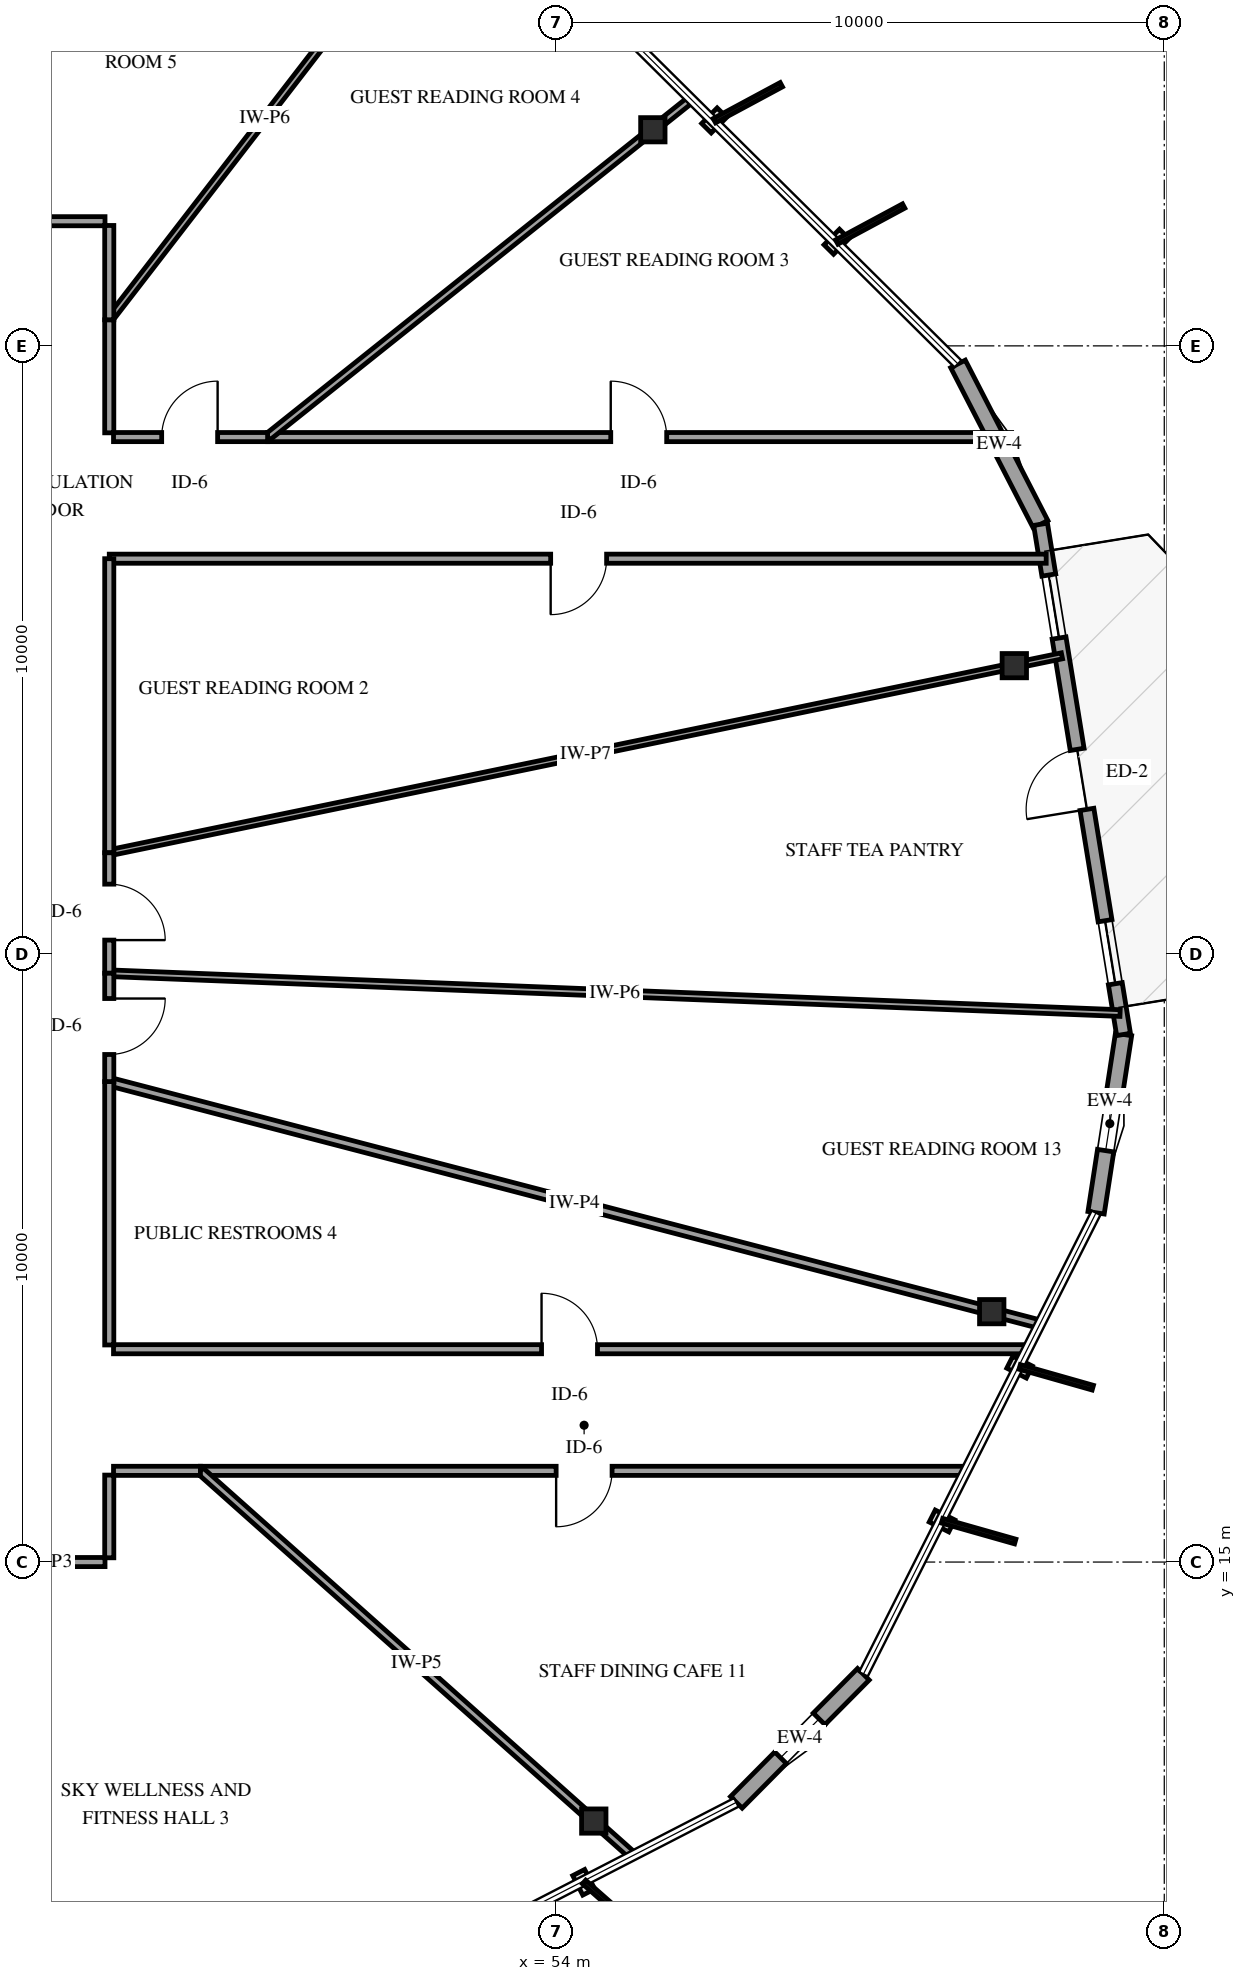
"""IFC4 building model, lengths in metres.
Left out: names, types, materials, properties, quantities, classifications, styles, units other than length and angle.
Written with IfcOpenShell. Run it as: python <this file> out.ifc"""

import sys

from ifc_helpers import new_model, si_unit, direction, frame, frame_2d, origin, origin_2d, place, context, subcontext, project, spatial, rectangle, i_section, extrude, element, fill, save


model = new_model("IFC4")
c1 = context("Model", 3, precision=1e-05, world=origin(), true_north=direction((0.0, 1.0)))
c2 = subcontext(c1, "Body", "Model", "MODEL_VIEW")
j1 = project(units=[si_unit("LENGTHUNIT", "METRE"), si_unit("PLANEANGLEUNIT", "RADIAN")], contexts=[c1])
p1 = place(None, origin())
s1 = spatial("IfcSite", under=j1, at=p1, CompositionType="ELEMENT")
p2 = place(p1, origin())
s2 = spatial("IfcBuilding", under=s1, at=p2, CompositionType="ELEMENT")
p3 = place(p2, frame((0.0, 0.0, 265.0)))
s3 = spatial("IfcBuildingStorey", under=s2, at=p3, CompositionType="ELEMENT", Elevation=265.0)
for number, where, z_axis, x_axis in (
    (1, (61.534, 29.741, 0.0), (0.0, 0.0, 1.0), (1.0, 0.0, 0.0)),
    (2, (55.589, 38.554, 0.0), (0.0, 0.0, 1.0), (1.0, 0.0, 0.0)),
    (3, (54.618, 10.74, 0.0), (0.0, 0.0, 1.0), (1.0, 0.0, 0.0)),
    (4, (61.163, 19.117, 0.0), (0.0, 0.0, 1.0), (1.0, 0.0, 0.0)),
):
    element("IfcColumn", number, at=place(p3, frame(where, z_axis=z_axis, x_axis=x_axis)), inside=s3, PredefinedType="COLUMN", context=c2, shape_type="SweptSolid", body=[
        extrude(i_section(OverallWidth=0.401, OverallDepth=0.399, WebThickness=0.025, FlangeThickness=0.04, FilletRadius=0.038, at=origin_2d()), origin(), (0.0, 0.0, 1.0), 3.75),
    ])
p4 = place(p3, frame((56.962, 11.048, 0.0), z_axis=(0.0, 0.0, 1.0), x_axis=(0.704179352497, 0.71002214016, 0.0)))
e5 = element("IfcWall", 5, at=p4, inside=s3, PredefinedType="SOLIDWALL", context=c2, shape_type="SweptSolid", body=[
    extrude(rectangle(XDim=2.967, YDim=0.27, at=frame_2d((1.483, 0.0))), origin(), (0.0, 0.0, 1.0), 2.829),
])
p5 = place(p4, frame((1.033, 0.0, 0.75)))
e6 = element("IfcOpeningElement", 6, at=p5, cuts=e5, PredefinedType="OPENING", context=c2, shape_type="SweptSolid", body=[
    extrude(rectangle(XDim=0.9, YDim=1.5, at=frame_2d((0.45, 0.75))), frame((0.0, 0.145, 0.0), z_axis=(0.0, -1.0, 0.0), x_axis=(1.0, 0.0, 0.0)), (0.0, 0.0, 1.0), 0.29),
])
p6 = place(p3, frame((62.878, 20.744, 0.0), z_axis=(0.0, 0.0, 1.0), x_axis=(0.152335472576, 0.988328843956, 0.0)))
e7 = element("IfcWall", 7, at=p6, inside=s3, PredefinedType="SOLIDWALL", context=c2, shape_type="SweptSolid", body=[
    extrude(rectangle(XDim=2.967, YDim=0.27, at=frame_2d((1.483, 0.0))), origin(), (0.0, 0.0, 1.0), 2.829),
])
p7 = place(p6, frame((1.033, 0.0, 0.75)))
e8 = element("IfcOpeningElement", 8, at=p7, cuts=e7, PredefinedType="OPENING", context=c2, shape_type="SweptSolid", body=[
    extrude(rectangle(XDim=0.9, YDim=1.5, at=frame_2d((0.45, 0.75))), frame((0.0, 0.145, 0.0), z_axis=(0.0, -1.0, 0.0), x_axis=(1.0, 0.0, 0.0)), (0.0, 0.0, 1.0), 0.29),
])
p8 = place(p3, frame((61.966, 32.066, 0.0), z_axis=(0.0, 0.0, 1.0), x_axis=(-0.457716142293, 0.889098382118, 0.0)))
e9 = element("IfcWall", 9, at=p8, inside=s3, PredefinedType="SOLIDWALL", context=c2, shape_type="SweptSolid", body=[
    extrude(rectangle(XDim=2.967, YDim=0.27, at=frame_2d((1.483, 0.0))), origin(), (0.0, 0.0, 1.0), 2.829),
])
p9 = place(p3, frame((63.33, 23.676, 0.0), z_axis=(0.0, 0.0, 1.0), x_axis=(-0.16056432401, 0.987025378526, 0.0)))
e10 = element("IfcWall", 10, at=p9, inside=s3, PredefinedType="SOLIDWALL", context=c2, shape_type="SweptSolid", body=[
    extrude(rectangle(XDim=8.5, YDim=0.23, at=frame_2d((4.25, 0.0))), origin(), (0.0, 0.0, 1.0), 2.829),
])
p10 = place(p9, frame((3.75, 0.0, 0.0)))
e11 = element("IfcOpeningElement", 11, at=p10, cuts=e10, PredefinedType="OPENING", context=c2, shape_type="SweptSolid", body=[
    extrude(rectangle(XDim=1.0, YDim=2.15, at=frame_2d((0.5, 1.075))), frame((0.0, 0.125, 0.0), z_axis=(0.0, -1.0, 0.0), x_axis=(1.0, 0.0, 0.0)), (0.0, 0.0, 1.0), 0.25),
])
p11 = place(p9, frame((0.845, 0.0, 0.72)))
e12 = element("IfcOpeningElement", 12, at=p11, cuts=e10, PredefinedType="OPENING", context=c2, shape_type="SweptSolid", body=[
    extrude(rectangle(XDim=1.05, YDim=1.55, at=frame_2d((0.525, 0.775))), frame((0.0, 0.125, 0.0), z_axis=(0.0, -1.0, 0.0), x_axis=(1.0, 0.0, 0.0)), (0.0, 0.0, 1.0), 0.25),
])
p12 = place(p9, frame((6.605, 0.0, 0.72)))
e13 = element("IfcOpeningElement", 13, at=p12, cuts=e10, PredefinedType="OPENING", context=c2, shape_type="SweptSolid", body=[
    extrude(rectangle(XDim=1.05, YDim=1.55, at=frame_2d((0.525, 0.775))), frame((0.0, 0.125, 0.0), z_axis=(0.0, -1.0, 0.0), x_axis=(1.0, 0.0, 0.0)), (0.0, 0.0, 1.0), 0.25),
])
p13 = place(p3, frame((63.273, 24.028, 0.0), z_axis=(0.0, 0.0, 1.0), x_axis=(-0.999224530372, 0.039374330499, 0.0)))
e14 = element("IfcWall", 14, at=p13, inside=s3, PredefinedType="PARTITIONING", context=c2, shape_type="SweptSolid", body=[
    extrude(rectangle(XDim=16.636, YDim=0.11, at=frame_2d((8.318, 0.0))), origin(), (0.0, 0.0, 1.0), 3.45),
])
p14 = place(p3, frame((46.65, 26.664, 0.0), z_axis=(0.0, 0.0, 1.0), x_axis=(0.97929058144, 0.202459766627, 0.0)))
e15 = element("IfcWall", 15, at=p14, inside=s3, PredefinedType="PARTITIONING", context=c2, shape_type="SweptSolid", body=[
    extrude(rectangle(XDim=15.998, YDim=0.1, at=frame_2d((7.999, 0.0))), origin(), (0.0, 0.0, 1.0), 2.745),
])
p15 = place(p3, frame((46.65, 22.901, 0.0), z_axis=(0.0, 0.0, 1.0), x_axis=(0.967654473488, -0.252279249916, 0.0)))
e16 = element("IfcWall", 16, at=p15, inside=s3, PredefinedType="PARTITIONING", context=c2, shape_type="SweptSolid", body=[
    extrude(rectangle(XDim=15.816, YDim=0.14, at=frame_2d((7.908, 0.0))), origin(), (0.0, 0.0, 1.0), 3.45),
])
p16 = place(p3, frame((62.058, 31.5, 0.0), z_axis=(0.0, 0.0, 1.0), x_axis=(-1.0, 0.0, 0.0)))
e17 = element("IfcWall", 17, at=p16, inside=s3, PredefinedType="PARTITIONING", context=c2, shape_type="SweptSolid", body=[
    extrude(rectangle(XDim=15.408, YDim=0.15, at=frame_2d((7.704, 0.0))), origin(), (0.0, 0.0, 1.0), 2.824),
])
p17 = place(p16, frame((7.229, 0.0, 0.0)))
e18 = element("IfcOpeningElement", 18, at=p17, cuts=e17, PredefinedType="OPENING", context=c2, shape_type="SweptSolid", body=[
    extrude(rectangle(XDim=0.92, YDim=2.12, at=frame_2d((0.46, 1.06))), frame((0.0, 0.085, 0.0), z_axis=(0.0, -1.0, 0.0), x_axis=(1.0, 0.0, 0.0)), (0.0, 0.0, 1.0), 0.17),
])
p18 = place(p3, frame((46.72, 18.5, 0.0), z_axis=(0.0, 0.0, 1.0), x_axis=(1.0, 0.0, 0.0)))
e19 = element("IfcWall", 19, at=p18, inside=s3, PredefinedType="PARTITIONING", context=c2, shape_type="SweptSolid", body=[
    extrude(rectangle(XDim=15.027, YDim=0.15, at=frame_2d((7.514, 0.0))), origin(), (0.0, 0.0, 1.0), 2.745),
])
p19 = place(p18, frame((7.039, 0.0, 0.0)))
e20 = element("IfcOpeningElement", 20, at=p19, cuts=e19, PredefinedType="OPENING", context=c2, shape_type="SweptSolid", body=[
    extrude(rectangle(XDim=0.92, YDim=2.12, at=frame_2d((0.46, 1.06))), frame((0.0, 0.085, 0.0), z_axis=(0.0, -1.0, 0.0), x_axis=(1.0, 0.0, 0.0)), (0.0, 0.0, 1.0), 0.17),
])
p20 = place(p3, frame((60.738, 16.5, 0.0), z_axis=(0.0, 0.0, 1.0), x_axis=(-1.0, 0.0, 0.0)))
e21 = element("IfcWall", 21, at=p20, inside=s3, PredefinedType="PARTITIONING", context=c2, shape_type="SweptSolid", body=[
    extrude(rectangle(XDim=12.589, YDim=0.15, at=frame_2d((6.294, 0.0))), origin(), (0.0, 0.0, 1.0), 3.45),
])
p21 = place(p20, frame((5.819, 0.0, 0.0)))
e22 = element("IfcOpeningElement", 22, at=p21, cuts=e21, PredefinedType="OPENING", context=c2, shape_type="SweptSolid", body=[
    extrude(rectangle(XDim=0.92, YDim=2.12, at=frame_2d((0.46, 1.06))), frame((0.0, 0.085, 0.0), z_axis=(0.0, -1.0, 0.0), x_axis=(1.0, 0.0, 0.0)), (0.0, 0.0, 1.0), 0.17),
])
p22 = place(p3, frame((49.254, 33.5, 0.0), z_axis=(0.0, 0.0, 1.0), x_axis=(1.0, 0.0, 0.0)))
e23 = element("IfcWall", 23, at=p22, inside=s3, PredefinedType="PARTITIONING", context=c2, shape_type="SweptSolid", body=[
    extrude(rectangle(XDim=12.236, YDim=0.15, at=frame_2d((6.118, 0.0))), origin(), (0.0, 0.0, 1.0), 3.45),
])
p23 = place(p22, frame((5.643, 0.0, 0.0)))
e24 = element("IfcOpeningElement", 24, at=p23, cuts=e23, PredefinedType="OPENING", context=c2, shape_type="SweptSolid", body=[
    extrude(rectangle(XDim=0.92, YDim=2.12, at=frame_2d((0.46, 1.06))), frame((0.0, 0.085, 0.0), z_axis=(0.0, -1.0, 0.0), x_axis=(1.0, 0.0, 0.0)), (0.0, 0.0, 1.0), 0.17),
])
p24 = place(p3, frame((48.149, 16.5, 0.0), z_axis=(0.0, 0.0, 1.0), x_axis=(0.746893977038, -0.664943145738, 0.0)))
e25 = element("IfcWall", 25, at=p24, inside=s3, PredefinedType="PARTITIONING", context=c2, shape_type="SweptSolid", body=[
    extrude(rectangle(XDim=9.518, YDim=0.13, at=frame_2d((4.759, 0.0))), origin(), (0.0, 0.0, 1.0), 2.828),
])
p25 = place(p3, frame((49.254, 33.5, 0.0), z_axis=(0.0, 0.0, 1.0), x_axis=(0.781710283579, 0.623641750163, 0.0)))
e26 = element("IfcWall", 26, at=p25, inside=s3, PredefinedType="PARTITIONING", context=c2, shape_type="SweptSolid", body=[
    extrude(rectangle(XDim=8.909, YDim=0.12, at=frame_2d((4.455, 0.0))), origin(), (0.0, 0.0, 1.0), 3.45),
])
p26 = place(p3, frame((46.65, 35.429, 0.0), z_axis=(0.0, 0.0, 1.0), x_axis=(0.611113468405, 0.791543004981, 0.0)))
e27 = element("IfcWall", 27, at=p26, inside=s3, PredefinedType="PARTITIONING", context=c2, shape_type="SweptSolid", body=[
    extrude(rectangle(XDim=8.364, YDim=0.11, at=frame_2d((4.182, 0.0))), origin(), (0.0, 0.0, 1.0), 2.828),
])
p27 = place(p3, frame((43.508, 37.05, 0.0), z_axis=(0.0, 0.0, 1.0), x_axis=(0.377131345073, 0.926159785654, 0.0)))
e28 = element("IfcWall", 28, at=p27, inside=s3, PredefinedType="PARTITIONING", context=c2, shape_type="SweptSolid", body=[
    extrude(rectangle(XDim=6.371, YDim=0.12, at=frame_2d((3.186, 0.0))), origin(), (0.0, 0.0, 1.0), 2.745),
])
p28 = place(p3, frame((46.65, 31.5, 0.0), z_axis=(0.0, 0.0, 1.0), x_axis=(0.0, -1.0, 0.0)))
e29 = element("IfcWall", 29, at=p28, inside=s3, PredefinedType="PARTITIONING", context=c2, shape_type="SweptSolid", body=[
    extrude(rectangle(XDim=4.836, YDim=0.15, at=frame_2d((2.418, 0.0))), origin(), (0.0, 0.0, 1.0), 3.45),
])
p29 = place(p3, frame((46.65, 22.901, 0.0), z_axis=(0.0, 0.0, 1.0), x_axis=(0.0, -1.0, 0.0)))
e30 = element("IfcWall", 30, at=p29, inside=s3, PredefinedType="PARTITIONING", context=c2, shape_type="SweptSolid", body=[
    extrude(rectangle(XDim=4.331, YDim=0.15, at=frame_2d((2.166, 0.0))), origin(), (0.0, 0.0, 1.0), 3.45),
])
p30 = place(p3, frame((43.508, 37.05, 0.0), z_axis=(0.0, 0.0, 1.0), x_axis=(1.0, 0.0, 0.0)))
e31 = element("IfcWall", 31, at=p30, inside=s3, PredefinedType="PARTITIONING", context=c2, shape_type="SweptSolid", body=[
    extrude(rectangle(XDim=3.072, YDim=0.15, at=frame_2d((1.536, 0.0))), origin(), (0.0, 0.0, 1.0), 3.45),
])
p31 = place(p30, frame((1.061, 0.0, 0.0)))
e32 = element("IfcOpeningElement", 32, at=p31, cuts=e31, PredefinedType="OPENING", context=c2, shape_type="SweptSolid", body=[
    extrude(rectangle(XDim=0.92, YDim=2.12, at=frame_2d((0.46, 1.06))), frame((0.0, 0.085, 0.0), z_axis=(0.0, -1.0, 0.0), x_axis=(1.0, 0.0, 0.0)), (0.0, 0.0, 1.0), 0.17),
])
p32 = place(p3, frame((46.72, 33.5, 0.0), z_axis=(0.0, 0.0, 1.0), x_axis=(1.0, 0.0, 0.0)))
e33 = element("IfcWall", 33, at=p32, inside=s3, PredefinedType="PARTITIONING", context=c2, shape_type="SweptSolid", body=[
    extrude(rectangle(XDim=2.534, YDim=0.15, at=frame_2d((1.267, 0.0))), origin(), (0.0, 0.0, 1.0), 3.45),
])
p33 = place(p32, frame((0.792, 0.0, 0.0)))
e34 = element("IfcOpeningElement", 34, at=p33, cuts=e33, PredefinedType="OPENING", context=c2, shape_type="SweptSolid", body=[
    extrude(rectangle(XDim=0.92, YDim=2.12, at=frame_2d((0.46, 1.06))), frame((0.0, 0.085, 0.0), z_axis=(0.0, -1.0, 0.0), x_axis=(1.0, 0.0, 0.0)), (0.0, 0.0, 1.0), 0.17),
])
p34 = place(p3, frame((46.65, 26.664, 0.0), z_axis=(0.0, 0.0, 1.0), x_axis=(0.0, -1.0, 0.0)))
e35 = element("IfcWall", 35, at=p34, inside=s3, PredefinedType="PARTITIONING", context=c2, shape_type="SweptSolid", body=[
    extrude(rectangle(XDim=1.981, YDim=0.15, at=frame_2d((0.99, 0.0))), origin(), (0.0, 0.0, 1.0), 3.45),
])
p35 = place(p34, frame((0.516, 0.0, 0.0)))
e36 = element("IfcOpeningElement", 36, at=p35, cuts=e35, PredefinedType="OPENING", context=c2, shape_type="SweptSolid", body=[
    extrude(rectangle(XDim=0.92, YDim=2.12, at=frame_2d((0.46, 1.06))), frame((0.0, 0.085, 0.0), z_axis=(0.0, -1.0, 0.0), x_axis=(1.0, 0.0, 0.0)), (0.0, 0.0, 1.0), 0.17),
])
p36 = place(p3, frame((46.58, 15.0, 0.0), z_axis=(0.0, 0.0, 1.0), x_axis=(-1.0, 0.0, 0.0)))
e37 = element("IfcWall", 37, at=p36, inside=s3, PredefinedType="PARTITIONING", context=c2, shape_type="SweptSolid", body=[
    extrude(rectangle(XDim=1.91, YDim=0.15, at=frame_2d((0.955, 0.0))), origin(), (0.0, 0.0, 1.0), 3.45),
])
p37 = place(p3, frame((46.65, 35.429, 0.0), z_axis=(0.0, 0.0, 1.0), x_axis=(0.0, -1.0, 0.0)))
e38 = element("IfcWall", 38, at=p37, inside=s3, PredefinedType="PARTITIONING", context=c2, shape_type="SweptSolid", body=[
    extrude(rectangle(XDim=1.859, YDim=0.15, at=frame_2d((0.929, 0.0))), origin(), (0.0, 0.0, 1.0), 3.45),
])
p38 = place(p3, frame((46.65, 24.683, 0.0), z_axis=(0.0, 0.0, 1.0), x_axis=(0.0, -1.0, 0.0)))
e39 = element("IfcWall", 39, at=p38, inside=s3, PredefinedType="PARTITIONING", context=c2, shape_type="SweptSolid", body=[
    extrude(rectangle(XDim=1.782, YDim=0.15, at=frame_2d((0.891, 0.0))), origin(), (0.0, 0.0, 1.0), 3.45),
])
p39 = place(p38, frame((0.416, 0.0, 0.0)))
e40 = element("IfcOpeningElement", 40, at=p39, cuts=e39, PredefinedType="OPENING", context=c2, shape_type="SweptSolid", body=[
    extrude(rectangle(XDim=0.92, YDim=2.12, at=frame_2d((0.46, 1.06))), frame((0.0, 0.085, 0.0), z_axis=(0.0, -1.0, 0.0), x_axis=(1.0, 0.0, 0.0)), (0.0, 0.0, 1.0), 0.17),
])
p40 = place(p3, frame((46.65, 36.98, 0.0), z_axis=(0.0, 0.0, 1.0), x_axis=(0.0, -1.0, 0.0)))
e41 = element("IfcWall", 41, at=p40, inside=s3, PredefinedType="PARTITIONING", context=c2, shape_type="SweptSolid", body=[
    extrude(rectangle(XDim=1.551, YDim=0.15, at=frame_2d((0.775, 0.0))), origin(), (0.0, 0.0, 1.0), 3.45),
])
p41 = place(p3, frame((48.149, 16.5, 0.0), z_axis=(0.0, 0.0, 1.0), x_axis=(-1.0, 0.0, 0.0)))
e42 = element("IfcWall", 42, at=p41, inside=s3, PredefinedType="PARTITIONING", context=c2, shape_type="SweptSolid", body=[
    extrude(rectangle(XDim=1.429, YDim=0.15, at=frame_2d((0.714, 0.0))), origin(), (0.0, 0.0, 1.0), 2.828),
])
p42 = place(p3, frame((46.65, 16.43, 0.0), z_axis=(0.0, 0.0, 1.0), x_axis=(0.0, -1.0, 0.0)))
e43 = element("IfcWall", 43, at=p42, inside=s3, PredefinedType="PARTITIONING", context=c2, shape_type="SweptSolid", body=[
    extrude(rectangle(XDim=1.36, YDim=0.15, at=frame_2d((0.68, 0.0))), origin(), (0.0, 0.0, 1.0), 3.45),
])
p43 = place(p5, origin())
e44 = element("IfcWindow", 44, at=p43, inside=s3, PartitioningType="SINGLE_PANEL", PredefinedType="WINDOW", context=c2, shape_type="SweptSolid", body=[
    extrude(rectangle(XDim=0.9, YDim=1.5, at=frame_2d((0.45, 0.75))), frame((0.0, 0.03, 0.0), z_axis=(0.0, -1.0, 0.0), x_axis=(1.0, 0.0, 0.0)), (0.0, 0.0, 1.0), 0.06),
])
fill(e6, e44)
p44 = place(p7, origin())
e45 = element("IfcWindow", 45, at=p44, inside=s3, PartitioningType="SINGLE_PANEL", PredefinedType="WINDOW", context=c2, shape_type="SweptSolid", body=[
    extrude(rectangle(XDim=0.9, YDim=1.5, at=frame_2d((0.45, 0.75))), frame((0.0, 0.03, 0.0), z_axis=(0.0, -1.0, 0.0), x_axis=(1.0, 0.0, 0.0)), (0.0, 0.0, 1.0), 0.06),
])
fill(e8, e45)
p45 = place(p10, origin())
e46 = element("IfcDoor", 46, at=p45, inside=s3, OperationType="SINGLE_SWING_LEFT", PredefinedType="DOOR", context=c2, shape_type="SweptSolid", body=[
    extrude(rectangle(XDim=1.0, YDim=2.15, at=frame_2d((0.5, 1.075))), frame((0.0, 0.025, 0.0), z_axis=(0.0, -1.0, 0.0), x_axis=(1.0, 0.0, 0.0)), (0.0, 0.0, 1.0), 0.05),
])
fill(e11, e46)
p46 = place(p11, origin())
e47 = element("IfcWindow", 47, at=p46, inside=s3, PartitioningType="SINGLE_PANEL", PredefinedType="WINDOW", context=c2, shape_type="SweptSolid", body=[
    extrude(rectangle(XDim=1.05, YDim=1.55, at=frame_2d((0.525, 0.775))), frame((0.0, 0.03, 0.0), z_axis=(0.0, -1.0, 0.0), x_axis=(1.0, 0.0, 0.0)), (0.0, 0.0, 1.0), 0.06),
])
fill(e12, e47)
p47 = place(p12, origin())
e48 = element("IfcWindow", 48, at=p47, inside=s3, PartitioningType="SINGLE_PANEL", PredefinedType="WINDOW", context=c2, shape_type="SweptSolid", body=[
    extrude(rectangle(XDim=1.05, YDim=1.55, at=frame_2d((0.525, 0.775))), frame((0.0, 0.03, 0.0), z_axis=(0.0, -1.0, 0.0), x_axis=(1.0, 0.0, 0.0)), (0.0, 0.0, 1.0), 0.06),
])
fill(e13, e48)
p48 = place(p17, origin())
e49 = element("IfcDoor", 49, at=p48, inside=s3, OperationType="SINGLE_SWING_RIGHT", PredefinedType="DOOR", context=c2, shape_type="SweptSolid", body=[
    extrude(rectangle(XDim=0.92, YDim=2.12, at=frame_2d((0.46, 1.06))), frame((0.0, 0.025, 0.0), z_axis=(0.0, -1.0, 0.0), x_axis=(1.0, 0.0, 0.0)), (0.0, 0.0, 1.0), 0.05),
])
fill(e18, e49)
p49 = place(p19, origin())
e50 = element("IfcDoor", 50, at=p49, inside=s3, OperationType="SINGLE_SWING_LEFT", PredefinedType="DOOR", context=c2, shape_type="SweptSolid", body=[
    extrude(rectangle(XDim=0.92, YDim=2.12, at=frame_2d((0.46, 1.06))), frame((0.0, 0.025, 0.0), z_axis=(0.0, -1.0, 0.0), x_axis=(1.0, 0.0, 0.0)), (0.0, 0.0, 1.0), 0.05),
])
fill(e20, e50)
p50 = place(p21, origin())
e51 = element("IfcDoor", 51, at=p50, inside=s3, OperationType="SINGLE_SWING_RIGHT", PredefinedType="DOOR", context=c2, shape_type="SweptSolid", body=[
    extrude(rectangle(XDim=0.92, YDim=2.12, at=frame_2d((0.46, 1.06))), frame((0.0, 0.025, 0.0), z_axis=(0.0, -1.0, 0.0), x_axis=(1.0, 0.0, 0.0)), (0.0, 0.0, 1.0), 0.05),
])
fill(e22, e51)
p51 = place(p23, origin())
e52 = element("IfcDoor", 52, at=p51, inside=s3, OperationType="SINGLE_SWING_LEFT", PredefinedType="DOOR", context=c2, shape_type="SweptSolid", body=[
    extrude(rectangle(XDim=0.92, YDim=2.12, at=frame_2d((0.46, 1.06))), frame((0.0, 0.025, 0.0), z_axis=(0.0, -1.0, 0.0), x_axis=(1.0, 0.0, 0.0)), (0.0, 0.0, 1.0), 0.05),
])
fill(e24, e52)
p52 = place(p33, origin())
e53 = element("IfcDoor", 53, at=p52, inside=s3, OperationType="SINGLE_SWING_RIGHT", PredefinedType="DOOR", context=c2, shape_type="SweptSolid", body=[
    extrude(rectangle(XDim=0.92, YDim=2.12, at=frame_2d((0.46, 1.06))), frame((0.0, 0.025, 0.0), z_axis=(0.0, -1.0, 0.0), x_axis=(1.0, 0.0, 0.0)), (0.0, 0.0, 1.0), 0.05),
])
fill(e34, e53)
p53 = place(p35, origin())
e54 = element("IfcDoor", 54, at=p53, inside=s3, OperationType="SINGLE_SWING_RIGHT", PredefinedType="DOOR", context=c2, shape_type="SweptSolid", body=[
    extrude(rectangle(XDim=0.92, YDim=2.12, at=frame_2d((0.46, 1.06))), frame((0.0, 0.025, 0.0), z_axis=(0.0, -1.0, 0.0), x_axis=(1.0, 0.0, 0.0)), (0.0, 0.0, 1.0), 0.05),
])
fill(e36, e54)
p54 = place(p39, origin())
e55 = element("IfcDoor", 55, at=p54, inside=s3, OperationType="SINGLE_SWING_LEFT", PredefinedType="DOOR", context=c2, shape_type="SweptSolid", body=[
    extrude(rectangle(XDim=0.92, YDim=2.12, at=frame_2d((0.46, 1.06))), frame((0.0, 0.025, 0.0), z_axis=(0.0, -1.0, 0.0), x_axis=(1.0, 0.0, 0.0)), (0.0, 0.0, 1.0), 0.05),
])
fill(e40, e55)
save(model, sys.argv[1])
